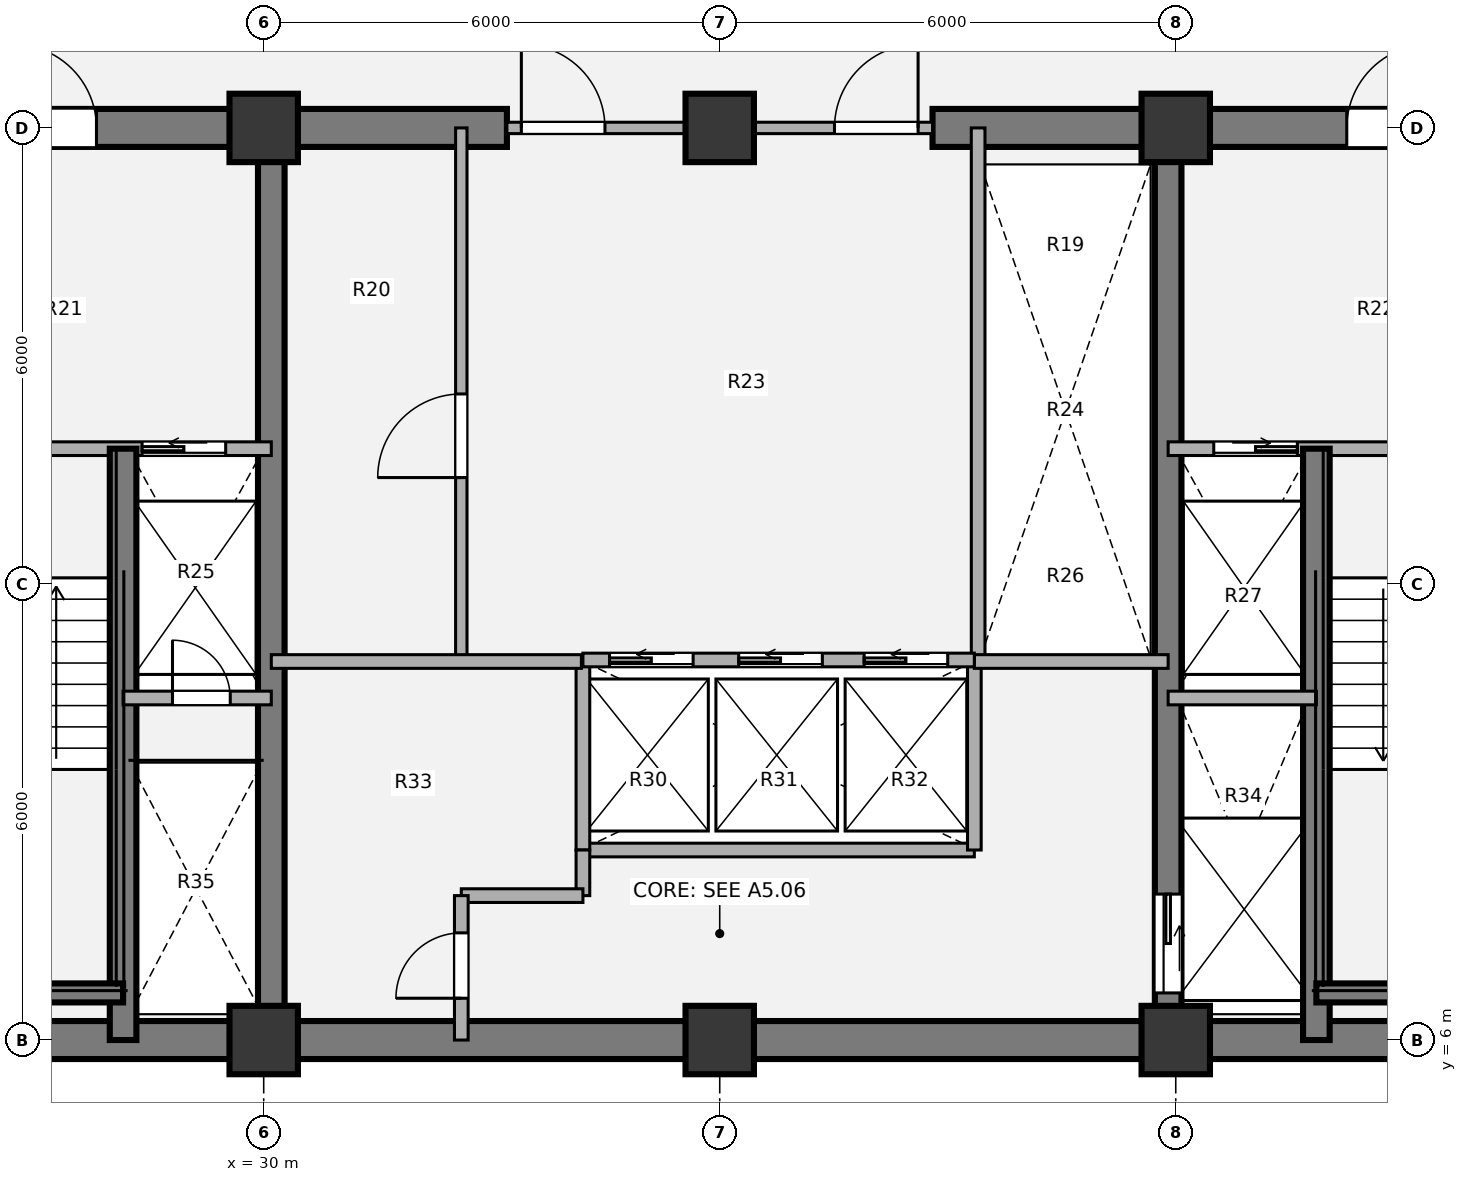
"""IFC4 building model, lengths in metres.
Left out: names, types, materials, properties, quantities, classifications, styles, units other than length and angle.
Written with IfcOpenShell. Run it as: python <this file> out.ifc"""

import sys

from ifc_helpers import new_model, si_unit, direction, frame, frame_2d, origin, origin_2d, place, context, subcontext, project, spatial, rectangle, extrude, source, transform, mapped, element, fill, save


model = new_model("IFC4")
c1 = context("Model", 3, precision=1e-05, world=origin(), true_north=direction((0.0, 1.0)))
c2 = subcontext(c1, "Body", "Model", "MODEL_VIEW")
j1 = project(units=[si_unit("LENGTHUNIT", "METRE"), si_unit("PLANEANGLEUNIT", "RADIAN")], contexts=[c1])
p1 = place(None, origin())
s1 = spatial("IfcSite", under=j1, at=p1, CompositionType="ELEMENT")
p2 = place(p1, origin())
s2 = spatial("IfcBuilding", under=s1, at=p2, CompositionType="ELEMENT")
p3 = place(p2, frame((0.0, 0.0, 101.16)))
s3 = spatial("IfcBuildingStorey", under=s2, at=p3, CompositionType="ELEMENT", Elevation=101.16)
m1 = source(origin(), c2, "Body", "SweptSolid", [
    extrude(rectangle(XDim=0.9, YDim=0.9, at=origin_2d()), origin(), (0.0, 0.0, 1.0), 3.78),
])
for number, where, z_axis, x_axis in (
    (1, (30.0, 6.0, 0.0), (0.0, 0.0, 1.0), (1.0, 0.0, 0.0)),
    (2, (36.0, 6.0, 0.0), (0.0, 0.0, 1.0), (1.0, 0.0, 0.0)),
    (3, (42.0, 6.0, 0.0), (0.0, 0.0, 1.0), (1.0, 0.0, 0.0)),
    (4, (30.0, 18.0, 0.0), (0.0, 0.0, 1.0), (1.0, 0.0, 0.0)),
    (5, (36.0, 18.0, 0.0), (0.0, 0.0, 1.0), (1.0, 0.0, 0.0)),
    (6, (42.0, 18.0, 0.0), (0.0, 0.0, 1.0), (1.0, 0.0, 0.0)),
):
    element("IfcColumn", number, at=place(p3, frame(where, z_axis=z_axis, x_axis=x_axis)), inside=s3, PredefinedType="COLUMN", context=c2, shape_type="MappedRepresentation", body=[
        mapped(m1, transform((0.0, 0.0, 0.0), x_axis=(1.0, 0.0, 0.0), y_axis=(0.0, 1.0, 0.0), z_axis=(0.0, 0.0, 1.0), scale=1.0)),
    ])
p4 = place(p3, frame((48.25, 6.0, 0.0), z_axis=(0.0, 0.0, 1.0), x_axis=(-1.0, 0.0, 0.0)))
e7 = element("IfcWall", 7, at=p4, inside=s3, PredefinedType="SHEAR", context=c2, shape_type="SweptSolid", body=[
    extrude(rectangle(XDim=24.5, YDim=0.5, at=frame_2d((12.25, 0.0))), origin(), (0.0, 0.0, 1.0), 3.78),
])
p5 = place(p3, frame((23.75, 18.0, 0.0), z_axis=(0.0, 0.0, 1.0), x_axis=(1.0, 0.0, 0.0)))
e8 = element("IfcWall", 8, at=p5, inside=s3, PredefinedType="SHEAR", context=c2, shape_type="SweptSolid", body=[
    extrude(rectangle(XDim=9.45, YDim=0.5, at=frame_2d((4.725, 0.0))), origin(), (0.0, 0.0, 1.0), 3.78),
])
p6 = place(p5, frame((2.95, 0.0, 0.0)))
e9 = element("IfcOpeningElement", 9, at=p6, cuts=e8, PredefinedType="OPENING", context=c2, shape_type="SweptSolid", body=[
    extrude(rectangle(XDim=1.1, YDim=2.1, at=origin_2d()), frame((0.55, 0.26, 1.05), z_axis=(0.0, -1.0, 0.0), x_axis=(1.0, 0.0, 0.0)), (0.0, 0.0, 1.0), 0.52),
])
p7 = place(p3, frame((38.8, 18.0, 0.0), z_axis=(0.0, 0.0, 1.0), x_axis=(1.0, 0.0, 0.0)))
e10 = element("IfcWall", 10, at=p7, inside=s3, PredefinedType="SHEAR", context=c2, shape_type="SweptSolid", body=[
    extrude(rectangle(XDim=9.45, YDim=0.5, at=frame_2d((4.725, 0.0))), origin(), (0.0, 0.0, 1.0), 3.78),
])
p8 = place(p7, frame((5.45, 0.0, 0.0)))
e11 = element("IfcOpeningElement", 11, at=p8, cuts=e10, PredefinedType="OPENING", context=c2, shape_type="SweptSolid", body=[
    extrude(rectangle(XDim=1.1, YDim=2.1, at=origin_2d()), frame((0.55, 0.26, 1.05), z_axis=(0.0, -1.0, 0.0), x_axis=(1.0, 0.0, 0.0)), (0.0, 0.0, 1.0), 0.52),
])
p9 = place(p3, frame((30.1, 6.0, 0.0), z_axis=(0.0, 0.0, 1.0), x_axis=(0.0, 1.0, 0.0)))
e12 = element("IfcWall", 12, at=p9, inside=s3, PredefinedType="SHEAR", context=c2, shape_type="SweptSolid", body=[
    extrude(rectangle(XDim=12.0, YDim=0.35, at=frame_2d((6.0, 0.0))), origin(), (0.0, 0.0, 1.0), 3.78),
])
p10 = place(p3, frame((41.9, 18.0, 0.0), z_axis=(0.0, 0.0, 1.0), x_axis=(0.0, -1.0, 0.0)))
e13 = element("IfcWall", 13, at=p10, inside=s3, PredefinedType="SHEAR", context=c2, shape_type="SweptSolid", body=[
    extrude(rectangle(XDim=12.0, YDim=0.35, at=frame_2d((6.0, 0.0))), origin(), (0.0, 0.0, 1.0), 3.78),
])
p11 = place(p10, frame((10.08, 0.0, 0.0)))
e14 = element("IfcOpeningElement", 14, at=p11, cuts=e13, PredefinedType="OPENING", context=c2, shape_type="SweptSolid", body=[
    extrude(rectangle(XDim=1.3, YDim=2.1, at=origin_2d()), frame((0.65, 0.185, 1.05), z_axis=(0.0, -1.0, 0.0), x_axis=(1.0, 0.0, 0.0)), (0.0, 0.0, 1.0), 0.37),
])
p12 = place(p3, frame((32.6, 11.0, 0.0), z_axis=(0.0, 0.0, 1.0), x_axis=(0.0, 1.0, 0.0)))
e15 = element("IfcWall", 15, at=p12, inside=s3, PredefinedType="PARTITIONING", context=c2, shape_type="SweptSolid", body=[
    extrude(rectangle(XDim=7.0, YDim=0.15, at=frame_2d((3.5, 0.0))), origin(), (0.0, 0.0, 1.0), 3.5),
])
p13 = place(p12, frame((2.4, 0.0, 0.0)))
e16 = element("IfcOpeningElement", 16, at=p13, cuts=e15, PredefinedType="OPENING", context=c2, shape_type="SweptSolid", body=[
    extrude(rectangle(XDim=1.1, YDim=2.1, at=origin_2d()), frame((0.55, 0.085, 1.05), z_axis=(0.0, -1.0, 0.0), x_axis=(1.0, 0.0, 0.0)), (0.0, 0.0, 1.0), 0.17),
])
p14 = place(p3, frame((34.2, 8.5, 0.0), z_axis=(0.0, 0.0, 1.0), x_axis=(1.0, 0.0, 0.0)))
e17 = element("IfcWall", 17, at=p14, inside=s3, PredefinedType="PARTITIONING", context=c2, shape_type="SweptSolid", body=[
    extrude(rectangle(XDim=5.15, YDim=0.18, at=frame_2d((2.575, 0.0))), origin(), (0.0, 0.0, 1.0), 3.5),
])
for number, where, z_axis, x_axis in (
    (18, (34.2, 8.5, 0.0), (0.0, 0.0, 1.0), (0.0, 1.0, 0.0)),
    (19, (39.35, 8.5, 0.0), (0.0, 0.0, 1.0), (0.0, 1.0, 0.0)),
):
    element("IfcWall", number, at=place(p3, frame(where, z_axis=z_axis, x_axis=x_axis)), inside=s3, PredefinedType="PARTITIONING", context=c2, shape_type="SweptSolid", body=[
        extrude(rectangle(XDim=2.5, YDim=0.18, at=frame_2d((1.25, 0.0))), origin(), (0.0, 0.0, 1.0), 3.5),
    ])
p15 = place(p3, frame((39.4, 11.0, 0.0), z_axis=(0.0, 0.0, 1.0), x_axis=(0.0, 1.0, 0.0)))
e20 = element("IfcWall", 20, at=p15, inside=s3, PredefinedType="PARTITIONING", context=c2, shape_type="SweptSolid", body=[
    extrude(rectangle(XDim=7.0, YDim=0.18, at=frame_2d((3.5, 0.0))), origin(), (0.0, 0.0, 1.0), 3.5),
])
p16 = place(p3, frame((30.1, 10.98, 0.0), z_axis=(0.0, 0.0, 1.0), x_axis=(1.0, 0.0, 0.0)))
e21 = element("IfcWall", 21, at=p16, inside=s3, PredefinedType="PARTITIONING", context=c2, shape_type="SweptSolid", body=[
    extrude(rectangle(XDim=4.08, YDim=0.18, at=frame_2d((2.04, 0.0))), origin(), (0.0, 0.0, 1.0), 3.5),
])
p17 = place(p3, frame((34.2, 7.9, 0.0), z_axis=(0.0, 0.0, 1.0), x_axis=(0.0, 1.0, 0.0)))
e22 = element("IfcWall", 22, at=p17, inside=s3, PredefinedType="PARTITIONING", context=c2, shape_type="SweptSolid", body=[
    extrude(rectangle(XDim=0.6, YDim=0.18, at=frame_2d((0.3, 0.0))), origin(), (0.0, 0.0, 1.0), 3.5),
])
p18 = place(p3, frame((32.6, 7.9, 0.0), z_axis=(0.0, 0.0, 1.0), x_axis=(1.0, 0.0, 0.0)))
e23 = element("IfcWall", 23, at=p18, inside=s3, PredefinedType="PARTITIONING", context=c2, shape_type="SweptSolid", body=[
    extrude(rectangle(XDim=1.6, YDim=0.18, at=frame_2d((0.8, 0.0))), origin(), (0.0, 0.0, 1.0), 3.5),
])
p19 = place(p3, frame((32.6, 6.0, 0.0), z_axis=(0.0, 0.0, 1.0), x_axis=(0.0, 1.0, 0.0)))
e24 = element("IfcWall", 24, at=p19, inside=s3, PredefinedType="PARTITIONING", context=c2, shape_type="SweptSolid", body=[
    extrude(rectangle(XDim=1.9, YDim=0.18, at=frame_2d((0.95, 0.0))), origin(), (0.0, 0.0, 1.0), 3.5),
])
p20 = place(p19, frame((0.55, 0.0, 0.0)))
e25 = element("IfcOpeningElement", 25, at=p20, cuts=e24, PredefinedType="OPENING", context=c2, shape_type="SweptSolid", body=[
    extrude(rectangle(XDim=0.86, YDim=2.1, at=origin_2d()), frame((0.43, 0.1, 1.05), z_axis=(0.0, -1.0, 0.0), x_axis=(1.0, 0.0, 0.0)), (0.0, 0.0, 1.0), 0.2),
])
p21 = place(p3, frame((39.35, 10.98, 0.0), z_axis=(0.0, 0.0, 1.0), x_axis=(1.0, 0.0, 0.0)))
e26 = element("IfcWall", 26, at=p21, inside=s3, PredefinedType="PARTITIONING", context=c2, shape_type="SweptSolid", body=[
    extrude(rectangle(XDim=2.55, YDim=0.18, at=frame_2d((1.275, 0.0))), origin(), (0.0, 0.0, 1.0), 3.5),
])
p22 = place(p3, frame((33.2, 18.0, 0.0), z_axis=(0.0, 0.0, 1.0), x_axis=(1.0, 0.0, 0.0)))
e27 = element("IfcWall", 27, at=p22, inside=s3, PredefinedType="PARTITIONING", context=c2, shape_type="SweptSolid", body=[
    extrude(rectangle(XDim=5.6, YDim=0.15, at=frame_2d((2.8, 0.0))), origin(), (0.0, 0.0, 1.0), 2.315),
])
p23 = place(p22, frame((0.19, 0.0, 0.0)))
e28 = element("IfcOpeningElement", 28, at=p23, cuts=e27, PredefinedType="OPENING", context=c2, shape_type="SweptSolid", body=[
    extrude(rectangle(XDim=1.1, YDim=2.1, at=origin_2d()), frame((0.55, 0.085, 1.05), z_axis=(0.0, -1.0, 0.0), x_axis=(1.0, 0.0, 0.0)), (0.0, 0.0, 1.0), 0.17),
])
p24 = place(p22, frame((4.31, 0.0, 0.0)))
e29 = element("IfcOpeningElement", 29, at=p24, cuts=e27, PredefinedType="OPENING", context=c2, shape_type="SweptSolid", body=[
    extrude(rectangle(XDim=1.1, YDim=2.1, at=origin_2d()), frame((0.55, 0.085, 1.05), z_axis=(0.0, -1.0, 0.0), x_axis=(1.0, 0.0, 0.0)), (0.0, 0.0, 1.0), 0.17),
])
p25 = place(p3, frame((24.0, 13.78, 0.0), z_axis=(0.0, 0.0, 1.0), x_axis=(1.0, 0.0, 0.0)))
e30 = element("IfcWall", 30, at=p25, inside=s3, PredefinedType="PARTITIONING", context=c2, shape_type="SweptSolid", body=[
    extrude(rectangle(XDim=6.1, YDim=0.18, at=frame_2d((3.05, 0.0))), origin(), (0.0, 0.0, 1.0), 3.5),
])
p26 = place(p25, frame((1.15, 0.0, 0.0)))
e31 = element("IfcOpeningElement", 31, at=p26, cuts=e30, PredefinedType="OPENING", context=c2, shape_type="SweptSolid", body=[
    extrude(rectangle(XDim=1.1, YDim=2.1, at=origin_2d()), frame((0.55, 0.1, 1.05), z_axis=(0.0, -1.0, 0.0), x_axis=(1.0, 0.0, 0.0)), (0.0, 0.0, 1.0), 0.2),
])
p27 = place(p25, frame((4.4, 0.0, 0.0)))
e32 = element("IfcOpeningElement", 32, at=p27, cuts=e30, PredefinedType="OPENING", context=c2, shape_type="SweptSolid", body=[
    extrude(rectangle(XDim=1.1, YDim=2.1, at=origin_2d()), frame((0.55, 0.1, 1.05), z_axis=(0.0, -1.0, 0.0), x_axis=(1.0, 0.0, 0.0)), (0.0, 0.0, 1.0), 0.2),
])
p28 = place(p3, frame((28.15, 6.0, 0.0), z_axis=(0.0, 0.0, 1.0), x_axis=(0.0, 1.0, 0.0)))
e33 = element("IfcWall", 33, at=p28, inside=s3, PredefinedType="SHEAR", context=c2, shape_type="SweptSolid", body=[
    extrude(rectangle(XDim=7.78, YDim=0.35, at=frame_2d((3.89, 0.0))), origin(), (0.0, 0.0, 1.0), 3.85),
])
p29 = place(p3, frame((24.58, 6.62, 0.0), z_axis=(0.0, 0.0, 1.0), x_axis=(1.0, 0.0, 0.0)))
e34 = element("IfcWall", 34, at=p29, inside=s3, PredefinedType="SHEAR", context=c2, shape_type="SweptSolid", body=[
    extrude(rectangle(XDim=3.57, YDim=0.25, at=frame_2d((1.785, 0.0))), origin(), (0.0, 0.0, 1.0), 3.85),
])
p30 = place(p3, frame((28.15, 10.5, 0.0), z_axis=(0.0, 0.0, 1.0), x_axis=(1.0, 0.0, 0.0)))
e35 = element("IfcWall", 35, at=p30, inside=s3, PredefinedType="PARTITIONING", context=c2, shape_type="SweptSolid", body=[
    extrude(rectangle(XDim=1.95, YDim=0.18, at=frame_2d((0.975, 0.0))), origin(), (0.0, 0.0, 1.0), 3.5),
])
p31 = place(p30, frame((0.65, 0.0, 0.0)))
e36 = element("IfcOpeningElement", 36, at=p31, cuts=e35, PredefinedType="OPENING", context=c2, shape_type="SweptSolid", body=[
    extrude(rectangle(XDim=0.76, YDim=2.05, at=origin_2d()), frame((0.38, 0.1, 1.025), z_axis=(0.0, -1.0, 0.0), x_axis=(1.0, 0.0, 0.0)), (0.0, 0.0, 1.0), 0.2),
])
p32 = place(p3, frame((41.9, 13.78, 0.0), z_axis=(0.0, 0.0, 1.0), x_axis=(1.0, 0.0, 0.0)))
e37 = element("IfcWall", 37, at=p32, inside=s3, PredefinedType="PARTITIONING", context=c2, shape_type="SweptSolid", body=[
    extrude(rectangle(XDim=6.1, YDim=0.18, at=frame_2d((3.05, 0.0))), origin(), (0.0, 0.0, 1.0), 3.5),
])
p33 = place(p32, frame((0.6, 0.0, 0.0)))
e38 = element("IfcOpeningElement", 38, at=p33, cuts=e37, PredefinedType="OPENING", context=c2, shape_type="SweptSolid", body=[
    extrude(rectangle(XDim=1.1, YDim=2.1, at=origin_2d()), frame((0.55, 0.1, 1.05), z_axis=(0.0, -1.0, 0.0), x_axis=(1.0, 0.0, 0.0)), (0.0, 0.0, 1.0), 0.2),
])
p34 = place(p32, frame((3.8, 0.0, 0.0)))
e39 = element("IfcOpeningElement", 39, at=p34, cuts=e37, PredefinedType="OPENING", context=c2, shape_type="SweptSolid", body=[
    extrude(rectangle(XDim=1.1, YDim=2.1, at=origin_2d()), frame((0.55, 0.1, 1.05), z_axis=(0.0, -1.0, 0.0), x_axis=(1.0, 0.0, 0.0)), (0.0, 0.0, 1.0), 0.2),
])
p35 = place(p3, frame((43.85, 6.0, 0.0), z_axis=(0.0, 0.0, 1.0), x_axis=(0.0, 1.0, 0.0)))
e40 = element("IfcWall", 40, at=p35, inside=s3, PredefinedType="SHEAR", context=c2, shape_type="SweptSolid", body=[
    extrude(rectangle(XDim=7.78, YDim=0.35, at=frame_2d((3.89, 0.0))), origin(), (0.0, 0.0, 1.0), 3.85),
])
p36 = place(p3, frame((43.85, 6.62, 0.0), z_axis=(0.0, 0.0, 1.0), x_axis=(1.0, 0.0, 0.0)))
e41 = element("IfcWall", 41, at=p36, inside=s3, PredefinedType="SHEAR", context=c2, shape_type="SweptSolid", body=[
    extrude(rectangle(XDim=3.57, YDim=0.25, at=frame_2d((1.785, 0.0))), origin(), (0.0, 0.0, 1.0), 3.85),
])
p37 = place(p3, frame((41.9, 10.5, 0.0), z_axis=(0.0, 0.0, 1.0), x_axis=(1.0, 0.0, 0.0)))
e42 = element("IfcWall", 42, at=p37, inside=s3, PredefinedType="PARTITIONING", context=c2, shape_type="SweptSolid", body=[
    extrude(rectangle(XDim=1.95, YDim=0.18, at=frame_2d((0.975, 0.0))), origin(), (0.0, 0.0, 1.0), 3.5),
])
p38 = place(p3, frame((34.2, 11.0, 0.0), z_axis=(0.0, 0.0, 1.0), x_axis=(1.0, 0.0, 0.0)))
e43 = element("IfcWall", 43, at=p38, inside=s3, PredefinedType="PARTITIONING", context=c2, shape_type="SweptSolid", body=[
    extrude(rectangle(XDim=5.15, YDim=0.18, at=frame_2d((2.575, 0.0))), origin(), (0.0, 0.0, 1.0), 3.5),
])
p39 = place(p38, frame((0.35, 0.0, 0.0)))
e44 = element("IfcOpeningElement", 44, at=p39, cuts=e43, PredefinedType="OPENING", context=c2, shape_type="SweptSolid", body=[
    extrude(rectangle(XDim=1.1, YDim=2.1, at=origin_2d()), frame((0.55, 0.1, 1.05), z_axis=(0.0, -1.0, 0.0), x_axis=(1.0, 0.0, 0.0)), (0.0, 0.0, 1.0), 0.2),
])
p40 = place(p38, frame((2.05, 0.0, 0.0)))
e45 = element("IfcOpeningElement", 45, at=p40, cuts=e43, PredefinedType="OPENING", context=c2, shape_type="SweptSolid", body=[
    extrude(rectangle(XDim=1.1, YDim=2.1, at=origin_2d()), frame((0.55, 0.1, 1.05), z_axis=(0.0, -1.0, 0.0), x_axis=(1.0, 0.0, 0.0)), (0.0, 0.0, 1.0), 0.2),
])
p41 = place(p38, frame((3.7, 0.0, 0.0)))
e46 = element("IfcOpeningElement", 46, at=p41, cuts=e43, PredefinedType="OPENING", context=c2, shape_type="SweptSolid", body=[
    extrude(rectangle(XDim=1.1, YDim=2.1, at=origin_2d()), frame((0.55, 0.1, 1.05), z_axis=(0.0, -1.0, 0.0), x_axis=(1.0, 0.0, 0.0)), (0.0, 0.0, 1.0), 0.2),
])
m2 = source(origin(), c2, "Body", "SweptSolid", [
    extrude(rectangle(XDim=1.1, YDim=2.1, at=origin_2d()), frame((0.55, 0.025, 1.05), z_axis=(0.0, -1.0, 0.0), x_axis=(1.0, 0.0, 0.0)), (0.0, 0.0, 1.0), 0.05),
])
p42 = place(p13, origin())
e47 = element("IfcDoor", 47, at=p42, inside=s3, OperationType="SINGLE_SWING_LEFT", PredefinedType="DOOR", context=c2, shape_type="MappedRepresentation", body=[
    mapped(m2, transform((0.0, 0.0, 0.0), x_axis=(1.0, 0.0, 0.0), y_axis=(0.0, 1.0, 0.0), z_axis=(0.0, 0.0, 1.0), scale=1.0)),
])
fill(e16, e47)
m3 = source(origin(), c2, "Body", "SweptSolid", [
    extrude(rectangle(XDim=0.86, YDim=2.1, at=origin_2d()), frame((0.43, 0.025, 1.05), z_axis=(0.0, -1.0, 0.0), x_axis=(1.0, 0.0, 0.0)), (0.0, 0.0, 1.0), 0.05),
])
p43 = place(p20, origin())
e48 = element("IfcDoor", 48, at=p43, inside=s3, OperationType="SINGLE_SWING_LEFT", PredefinedType="DOOR", context=c2, shape_type="MappedRepresentation", body=[
    mapped(m3, transform((0.0, 0.0, 0.0), x_axis=(1.0, 0.0, 0.0), y_axis=(0.0, 1.0, 0.0), z_axis=(0.0, 0.0, 1.0), scale=1.0)),
])
fill(e25, e48)
m4 = source(origin(), c2, "Body", "SweptSolid", [
    extrude(rectangle(XDim=1.1, YDim=2.1, at=origin_2d()), frame((0.55, 0.025, 1.05), z_axis=(0.0, -1.0, 0.0), x_axis=(1.0, 0.0, 0.0)), (0.0, 0.0, 1.0), 0.05),
])
p44 = place(p23, origin())
e49 = element("IfcDoor", 49, at=p44, inside=s3, OperationType="SINGLE_SWING_LEFT", PredefinedType="DOOR", context=c2, shape_type="MappedRepresentation", body=[
    mapped(m4, transform((0.0, 0.0, 0.0), x_axis=(1.0, 0.0, 0.0), y_axis=(0.0, 1.0, 0.0), z_axis=(0.0, 0.0, 1.0), scale=1.0)),
])
fill(e28, e49)
p45 = place(p24, origin())
e50 = element("IfcDoor", 50, at=p45, inside=s3, OperationType="SINGLE_SWING_RIGHT", PredefinedType="DOOR", context=c2, shape_type="MappedRepresentation", body=[
    mapped(m4, transform((0.0, 0.0, 0.0), x_axis=(1.0, 0.0, 0.0), y_axis=(0.0, 1.0, 0.0), z_axis=(0.0, 0.0, 1.0), scale=1.0)),
])
fill(e29, e50)
m5 = source(origin(), c2, "Body", "SweptSolid", [
    extrude(rectangle(XDim=1.1, YDim=2.1, at=origin_2d()), frame((0.55, 0.025, 1.05), z_axis=(0.0, -1.0, 0.0), x_axis=(1.0, 0.0, 0.0)), (0.0, 0.0, 1.0), 0.05),
])
p46 = place(p27, origin())
e51 = element("IfcDoor", 51, at=p46, inside=s3, OperationType="SLIDING_TO_LEFT", PredefinedType="DOOR", context=c2, shape_type="MappedRepresentation", body=[
    mapped(m5, transform((0.0, 0.0, 0.0), x_axis=(1.0, 0.0, 0.0), y_axis=(0.0, 1.0, 0.0), z_axis=(0.0, 0.0, 1.0), scale=1.0)),
])
fill(e32, e51)
m6 = source(origin(), c2, "Body", "SweptSolid", [
    extrude(rectangle(XDim=0.76, YDim=2.05, at=origin_2d()), frame((0.38, 0.025, 1.025), z_axis=(0.0, -1.0, 0.0), x_axis=(1.0, 0.0, 0.0)), (0.0, 0.0, 1.0), 0.05),
])
p47 = place(p31, origin())
e52 = element("IfcDoor", 52, at=p47, inside=s3, OperationType="SINGLE_SWING_LEFT", PredefinedType="DOOR", context=c2, shape_type="MappedRepresentation", body=[
    mapped(m6, transform((0.0, 0.0, 0.0), x_axis=(1.0, 0.0, 0.0), y_axis=(0.0, 1.0, 0.0), z_axis=(0.0, 0.0, 1.0), scale=1.0)),
])
fill(e36, e52)
p48 = place(p33, origin())
e53 = element("IfcDoor", 53, at=p48, inside=s3, OperationType="SLIDING_TO_RIGHT", PredefinedType="DOOR", context=c2, shape_type="MappedRepresentation", body=[
    mapped(m5, transform((0.0, 0.0, 0.0), x_axis=(1.0, 0.0, 0.0), y_axis=(0.0, 1.0, 0.0), z_axis=(0.0, 0.0, 1.0), scale=1.0)),
])
fill(e38, e53)
m7 = source(origin(), c2, "Body", "SweptSolid", [
    extrude(rectangle(XDim=1.3, YDim=2.1, at=origin_2d()), frame((0.65, 0.025, 1.05), z_axis=(0.0, -1.0, 0.0), x_axis=(1.0, 0.0, 0.0)), (0.0, 0.0, 1.0), 0.05),
])
p49 = place(p11, origin())
e54 = element("IfcDoor", 54, at=p49, inside=s3, OperationType="SLIDING_TO_LEFT", PredefinedType="DOOR", context=c2, shape_type="MappedRepresentation", body=[
    mapped(m7, transform((0.0, 0.0, 0.0), x_axis=(1.0, 0.0, 0.0), y_axis=(0.0, 1.0, 0.0), z_axis=(0.0, 0.0, 1.0), scale=1.0)),
])
fill(e14, e54)
p50 = place(p6, origin())
e55 = element("IfcDoor", 55, at=p50, inside=s3, OperationType="SINGLE_SWING_LEFT", PredefinedType="DOOR", context=c2, shape_type="MappedRepresentation", body=[
    mapped(m4, transform((0.0, 0.0, 0.0), x_axis=(1.0, 0.0, 0.0), y_axis=(0.0, 1.0, 0.0), z_axis=(0.0, 0.0, 1.0), scale=1.0)),
])
fill(e9, e55)
p51 = place(p8, origin())
e56 = element("IfcDoor", 56, at=p51, inside=s3, OperationType="SINGLE_SWING_RIGHT", PredefinedType="DOOR", context=c2, shape_type="MappedRepresentation", body=[
    mapped(m4, transform((0.0, 0.0, 0.0), x_axis=(1.0, 0.0, 0.0), y_axis=(0.0, 1.0, 0.0), z_axis=(0.0, 0.0, 1.0), scale=1.0)),
])
fill(e11, e56)
p52 = place(p39, origin())
e57 = element("IfcDoor", 57, at=p52, inside=s3, OperationType="SLIDING_TO_LEFT", PredefinedType="DOOR", context=c2, shape_type="MappedRepresentation", body=[
    mapped(m5, transform((0.0, 0.0, 0.0), x_axis=(1.0, 0.0, 0.0), y_axis=(0.0, 1.0, 0.0), z_axis=(0.0, 0.0, 1.0), scale=1.0)),
])
fill(e44, e57)
p53 = place(p40, origin())
e58 = element("IfcDoor", 58, at=p53, inside=s3, OperationType="SLIDING_TO_LEFT", PredefinedType="DOOR", context=c2, shape_type="MappedRepresentation", body=[
    mapped(m5, transform((0.0, 0.0, 0.0), x_axis=(1.0, 0.0, 0.0), y_axis=(0.0, 1.0, 0.0), z_axis=(0.0, 0.0, 1.0), scale=1.0)),
])
fill(e45, e58)
p54 = place(p41, origin())
e59 = element("IfcDoor", 59, at=p54, inside=s3, OperationType="SLIDING_TO_LEFT", PredefinedType="DOOR", context=c2, shape_type="MappedRepresentation", body=[
    mapped(m5, transform((0.0, 0.0, 0.0), x_axis=(1.0, 0.0, 0.0), y_axis=(0.0, 1.0, 0.0), z_axis=(0.0, 0.0, 1.0), scale=1.0)),
])
fill(e46, e59)
save(model, sys.argv[1])
